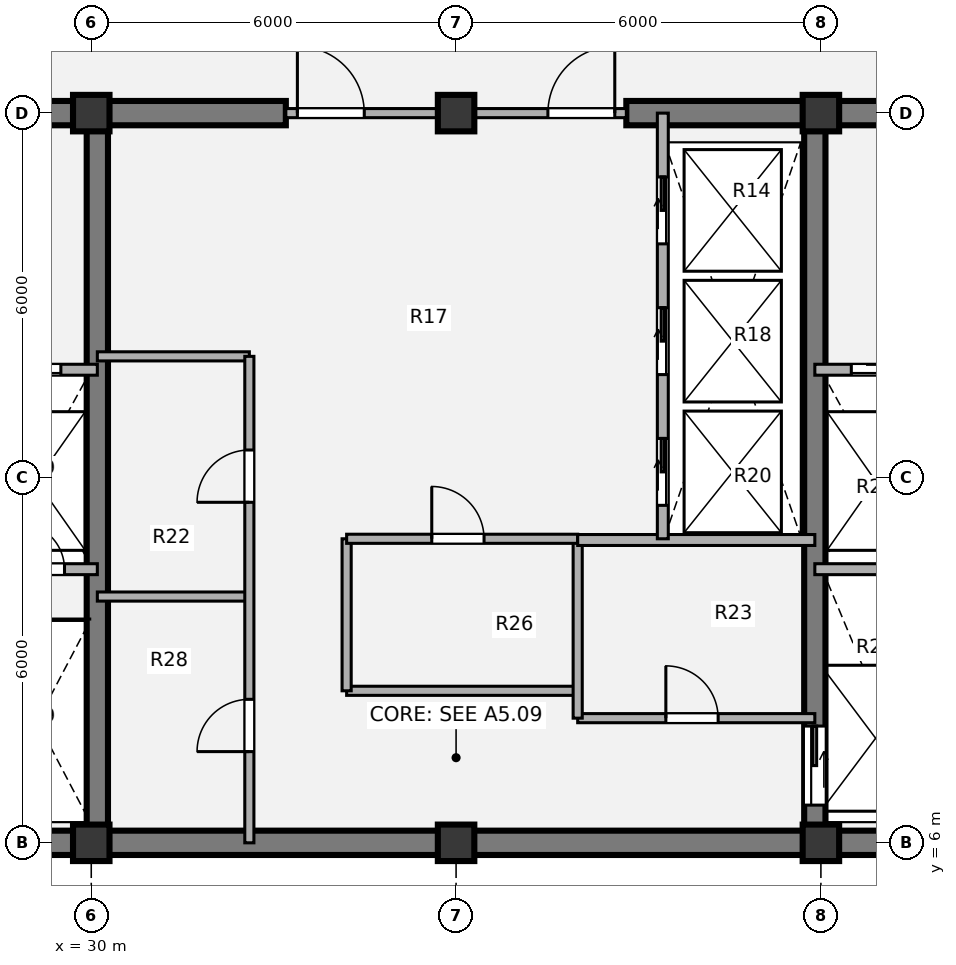
"""IFC4 building model, lengths in metres.
Left out: names, types, materials, properties, quantities, classifications, styles, units other than length and angle.
Written with IfcOpenShell. Run it as: python <this file> out.ifc"""

import sys

from ifc_helpers import new_model, si_unit, direction, frame, frame_2d, origin, origin_2d, place, context, subcontext, project, spatial, rectangle, extrude, source, transform, mapped, element, fill, save


model = new_model("IFC4")
c1 = context("Model", 3, precision=1e-05, world=origin(), true_north=direction((0.0, 1.0)))
c2 = subcontext(c1, "Body", "Model", "MODEL_VIEW")
j1 = project(units=[si_unit("LENGTHUNIT", "METRE"), si_unit("PLANEANGLEUNIT", "RADIAN")], contexts=[c1])
p1 = place(None, origin())
s1 = spatial("IfcSite", under=j1, at=p1, CompositionType="ELEMENT")
p2 = place(p1, origin())
s2 = spatial("IfcBuilding", under=s1, at=p2, CompositionType="ELEMENT")
p3 = place(p2, frame((0.0, 0.0, 283.5)))
s3 = spatial("IfcBuildingStorey", under=s2, at=p3, CompositionType="ELEMENT", Elevation=283.5)
m1 = source(origin(), c2, "Body", "SweptSolid", [
    extrude(rectangle(XDim=0.6, YDim=0.6, at=origin_2d()), origin(), (0.0, 0.0, 1.0), 3.78),
])
for number, where, z_axis, x_axis in (
    (1, (30.0, 6.0, 0.0), (0.0, 0.0, 1.0), (1.0, 0.0, 0.0)),
    (2, (36.0, 6.0, 0.0), (0.0, 0.0, 1.0), (1.0, 0.0, 0.0)),
    (3, (42.0, 6.0, 0.0), (0.0, 0.0, 1.0), (1.0, 0.0, 0.0)),
    (4, (30.0, 18.0, 0.0), (0.0, 0.0, 1.0), (1.0, 0.0, 0.0)),
    (5, (36.0, 18.0, 0.0), (0.0, 0.0, 1.0), (1.0, 0.0, 0.0)),
    (6, (42.0, 18.0, 0.0), (0.0, 0.0, 1.0), (1.0, 0.0, 0.0)),
):
    element("IfcColumn", number, at=place(p3, frame(where, z_axis=z_axis, x_axis=x_axis)), inside=s3, PredefinedType="COLUMN", context=c2, shape_type="MappedRepresentation", body=[
        mapped(m1, transform((0.0, 0.0, 0.0), x_axis=(1.0, 0.0, 0.0), y_axis=(0.0, 1.0, 0.0), z_axis=(0.0, 0.0, 1.0), scale=1.0)),
    ])
p4 = place(p3, frame((48.2, 6.0, 0.0), z_axis=(0.0, 0.0, 1.0), x_axis=(-1.0, 0.0, 0.0)))
e7 = element("IfcWall", 7, at=p4, inside=s3, PredefinedType="SHEAR", context=c2, shape_type="SweptSolid", body=[
    extrude(rectangle(XDim=24.4, YDim=0.4, at=frame_2d((12.2, 0.0))), origin(), (0.0, 0.0, 1.0), 3.78),
])
p5 = place(p3, frame((23.8, 18.0, 0.0), z_axis=(0.0, 0.0, 1.0), x_axis=(1.0, 0.0, 0.0)))
e8 = element("IfcWall", 8, at=p5, inside=s3, PredefinedType="SHEAR", context=c2, shape_type="SweptSolid", body=[
    extrude(rectangle(XDim=9.4, YDim=0.4, at=frame_2d((4.7, 0.0))), origin(), (0.0, 0.0, 1.0), 3.78),
])
p6 = place(p5, frame((2.95, 0.0, 0.0)))
e9 = element("IfcOpeningElement", 9, at=p6, cuts=e8, PredefinedType="OPENING", context=c2, shape_type="SweptSolid", body=[
    extrude(rectangle(XDim=1.1, YDim=2.1, at=origin_2d()), frame((0.55, 0.21, 1.05), z_axis=(0.0, -1.0, 0.0), x_axis=(1.0, 0.0, 0.0)), (0.0, 0.0, 1.0), 0.42),
])
p7 = place(p3, frame((38.8, 18.0, 0.0), z_axis=(0.0, 0.0, 1.0), x_axis=(1.0, 0.0, 0.0)))
e10 = element("IfcWall", 10, at=p7, inside=s3, PredefinedType="SHEAR", context=c2, shape_type="SweptSolid", body=[
    extrude(rectangle(XDim=9.4, YDim=0.4, at=frame_2d((4.7, 0.0))), origin(), (0.0, 0.0, 1.0), 3.78),
])
p8 = place(p7, frame((5.45, 0.0, 0.0)))
e11 = element("IfcOpeningElement", 11, at=p8, cuts=e10, PredefinedType="OPENING", context=c2, shape_type="SweptSolid", body=[
    extrude(rectangle(XDim=1.1, YDim=2.1, at=origin_2d()), frame((0.55, 0.21, 1.05), z_axis=(0.0, -1.0, 0.0), x_axis=(1.0, 0.0, 0.0)), (0.0, 0.0, 1.0), 0.42),
])
p9 = place(p3, frame((30.1, 6.0, 0.0), z_axis=(0.0, 0.0, 1.0), x_axis=(0.0, 1.0, 0.0)))
e12 = element("IfcWall", 12, at=p9, inside=s3, PredefinedType="SHEAR", context=c2, shape_type="SweptSolid", body=[
    extrude(rectangle(XDim=12.0, YDim=0.35, at=frame_2d((6.0, 0.0))), origin(), (0.0, 0.0, 1.0), 3.78),
])
p10 = place(p3, frame((41.9, 18.0, 0.0), z_axis=(0.0, 0.0, 1.0), x_axis=(0.0, -1.0, 0.0)))
e13 = element("IfcWall", 13, at=p10, inside=s3, PredefinedType="SHEAR", context=c2, shape_type="SweptSolid", body=[
    extrude(rectangle(XDim=12.0, YDim=0.35, at=frame_2d((6.0, 0.0))), origin(), (0.0, 0.0, 1.0), 3.78),
])
p11 = place(p10, frame((10.08, 0.0, 0.0)))
e14 = element("IfcOpeningElement", 14, at=p11, cuts=e13, PredefinedType="OPENING", context=c2, shape_type="SweptSolid", body=[
    extrude(rectangle(XDim=1.3, YDim=2.1, at=origin_2d()), frame((0.65, 0.185, 1.05), z_axis=(0.0, -1.0, 0.0), x_axis=(1.0, 0.0, 0.0)), (0.0, 0.0, 1.0), 0.37),
])
p12 = place(p3, frame((30.1, 14.0, 0.0), z_axis=(0.0, 0.0, 1.0), x_axis=(1.0, 0.0, 0.0)))
e15 = element("IfcWall", 15, at=p12, inside=s3, PredefinedType="PARTITIONING", context=c2, shape_type="SweptSolid", body=[
    extrude(rectangle(XDim=2.5, YDim=0.15, at=frame_2d((1.25, 0.0))), origin(), (0.0, 0.0, 1.0), 3.5),
])
p13 = place(p3, frame((34.2, 8.5, 0.0), z_axis=(0.0, 0.0, 1.0), x_axis=(1.0, 0.0, 0.0)))
e16 = element("IfcWall", 16, at=p13, inside=s3, PredefinedType="PARTITIONING", context=c2, shape_type="SweptSolid", body=[
    extrude(rectangle(XDim=3.8, YDim=0.15, at=frame_2d((1.9, 0.0))), origin(), (0.0, 0.0, 1.0), 3.5),
])
p14 = place(p3, frame((38.0, 8.05, 0.0), z_axis=(0.0, 0.0, 1.0), x_axis=(1.0, 0.0, 0.0)))
e17 = element("IfcWall", 17, at=p14, inside=s3, PredefinedType="PARTITIONING", context=c2, shape_type="SweptSolid", body=[
    extrude(rectangle(XDim=3.9, YDim=0.15, at=frame_2d((1.95, 0.0))), origin(), (0.0, 0.0, 1.0), 3.5),
])
p15 = place(p14, frame((1.45, 0.0, 0.0)))
e18 = element("IfcOpeningElement", 18, at=p15, cuts=e17, PredefinedType="OPENING", context=c2, shape_type="SweptSolid", body=[
    extrude(rectangle(XDim=0.86, YDim=2.1, at=origin_2d()), frame((0.43, 0.085, 1.05), z_axis=(0.0, -1.0, 0.0), x_axis=(1.0, 0.0, 0.0)), (0.0, 0.0, 1.0), 0.17),
])
p16 = place(p3, frame((34.2, 8.5, 0.0), z_axis=(0.0, 0.0, 1.0), x_axis=(0.0, 1.0, 0.0)))
e19 = element("IfcWall", 19, at=p16, inside=s3, PredefinedType="PARTITIONING", context=c2, shape_type="SweptSolid", body=[
    extrude(rectangle(XDim=2.5, YDim=0.15, at=frame_2d((1.25, 0.0))), origin(), (0.0, 0.0, 1.0), 3.5),
])
p17 = place(p3, frame((38.0, 8.05, 0.0), z_axis=(0.0, 0.0, 1.0), x_axis=(0.0, 1.0, 0.0)))
e20 = element("IfcWall", 20, at=p17, inside=s3, PredefinedType="PARTITIONING", context=c2, shape_type="SweptSolid", body=[
    extrude(rectangle(XDim=2.95, YDim=0.15, at=frame_2d((1.475, 0.0))), origin(), (0.0, 0.0, 1.0), 3.5),
])
p18 = place(p3, frame((34.2, 11.0, 0.0), z_axis=(0.0, 0.0, 1.0), x_axis=(1.0, 0.0, 0.0)))
e21 = element("IfcWall", 21, at=p18, inside=s3, PredefinedType="PARTITIONING", context=c2, shape_type="SweptSolid", body=[
    extrude(rectangle(XDim=3.8, YDim=0.15, at=frame_2d((1.9, 0.0))), origin(), (0.0, 0.0, 1.0), 3.5),
])
p19 = place(p18, frame((1.4, 0.0, 0.0)))
e22 = element("IfcOpeningElement", 22, at=p19, cuts=e21, PredefinedType="OPENING", context=c2, shape_type="SweptSolid", body=[
    extrude(rectangle(XDim=0.86, YDim=2.1, at=origin_2d()), frame((0.43, 0.085, 1.05), z_axis=(0.0, -1.0, 0.0), x_axis=(1.0, 0.0, 0.0)), (0.0, 0.0, 1.0), 0.17),
])
p20 = place(p3, frame((38.0, 10.98, 0.0), z_axis=(0.0, 0.0, 1.0), x_axis=(1.0, 0.0, 0.0)))
e23 = element("IfcWall", 23, at=p20, inside=s3, PredefinedType="PARTITIONING", context=c2, shape_type="SweptSolid", body=[
    extrude(rectangle(XDim=3.9, YDim=0.18, at=frame_2d((1.95, 0.0))), origin(), (0.0, 0.0, 1.0), 3.5),
])
p21 = place(p3, frame((30.1, 10.05, 0.0), z_axis=(0.0, 0.0, 1.0), x_axis=(1.0, 0.0, 0.0)))
e24 = element("IfcWall", 24, at=p21, inside=s3, PredefinedType="PARTITIONING", context=c2, shape_type="SweptSolid", body=[
    extrude(rectangle(XDim=2.5, YDim=0.15, at=frame_2d((1.25, 0.0))), origin(), (0.0, 0.0, 1.0), 3.5),
])
p22 = place(p3, frame((32.6, 6.0, 0.0), z_axis=(0.0, 0.0, 1.0), x_axis=(0.0, 1.0, 0.0)))
e25 = element("IfcWall", 25, at=p22, inside=s3, PredefinedType="PARTITIONING", context=c2, shape_type="SweptSolid", body=[
    extrude(rectangle(XDim=8.0, YDim=0.15, at=frame_2d((4.0, 0.0))), origin(), (0.0, 0.0, 1.0), 3.5),
])
p23 = place(p22, frame((1.5, 0.0, 0.0)))
e26 = element("IfcOpeningElement", 26, at=p23, cuts=e25, PredefinedType="OPENING", context=c2, shape_type="SweptSolid", body=[
    extrude(rectangle(XDim=0.86, YDim=2.1, at=origin_2d()), frame((0.43, 0.085, 1.05), z_axis=(0.0, -1.0, 0.0), x_axis=(1.0, 0.0, 0.0)), (0.0, 0.0, 1.0), 0.17),
])
p24 = place(p22, frame((5.6, 0.0, 0.0)))
e27 = element("IfcOpeningElement", 27, at=p24, cuts=e25, PredefinedType="OPENING", context=c2, shape_type="SweptSolid", body=[
    extrude(rectangle(XDim=0.86, YDim=2.1, at=origin_2d()), frame((0.43, 0.085, 1.05), z_axis=(0.0, -1.0, 0.0), x_axis=(1.0, 0.0, 0.0)), (0.0, 0.0, 1.0), 0.17),
])
p25 = place(p3, frame((33.2, 18.0, 0.0), z_axis=(0.0, 0.0, 1.0), x_axis=(1.0, 0.0, 0.0)))
e28 = element("IfcWall", 28, at=p25, inside=s3, PredefinedType="PARTITIONING", context=c2, shape_type="SweptSolid", body=[
    extrude(rectangle(XDim=5.6, YDim=0.15, at=frame_2d((2.8, 0.0))), origin(), (0.0, 0.0, 1.0), 2.515),
])
p26 = place(p25, frame((0.19, 0.0, 0.0)))
e29 = element("IfcOpeningElement", 29, at=p26, cuts=e28, PredefinedType="OPENING", context=c2, shape_type="SweptSolid", body=[
    extrude(rectangle(XDim=1.1, YDim=2.1, at=origin_2d()), frame((0.55, 0.085, 1.05), z_axis=(0.0, -1.0, 0.0), x_axis=(1.0, 0.0, 0.0)), (0.0, 0.0, 1.0), 0.17),
])
p27 = place(p25, frame((4.31, 0.0, 0.0)))
e30 = element("IfcOpeningElement", 30, at=p27, cuts=e28, PredefinedType="OPENING", context=c2, shape_type="SweptSolid", body=[
    extrude(rectangle(XDim=1.1, YDim=2.1, at=origin_2d()), frame((0.55, 0.085, 1.05), z_axis=(0.0, -1.0, 0.0), x_axis=(1.0, 0.0, 0.0)), (0.0, 0.0, 1.0), 0.17),
])
p28 = place(p3, frame((24.0, 13.78, 0.0), z_axis=(0.0, 0.0, 1.0), x_axis=(1.0, 0.0, 0.0)))
e31 = element("IfcWall", 31, at=p28, inside=s3, PredefinedType="PARTITIONING", context=c2, shape_type="SweptSolid", body=[
    extrude(rectangle(XDim=6.1, YDim=0.18, at=frame_2d((3.05, 0.0))), origin(), (0.0, 0.0, 1.0), 3.5),
])
p29 = place(p28, frame((1.15, 0.0, 0.0)))
e32 = element("IfcOpeningElement", 32, at=p29, cuts=e31, PredefinedType="OPENING", context=c2, shape_type="SweptSolid", body=[
    extrude(rectangle(XDim=1.1, YDim=2.1, at=origin_2d()), frame((0.55, 0.1, 1.05), z_axis=(0.0, -1.0, 0.0), x_axis=(1.0, 0.0, 0.0)), (0.0, 0.0, 1.0), 0.2),
])
p30 = place(p28, frame((4.4, 0.0, 0.0)))
e33 = element("IfcOpeningElement", 33, at=p30, cuts=e31, PredefinedType="OPENING", context=c2, shape_type="SweptSolid", body=[
    extrude(rectangle(XDim=1.1, YDim=2.1, at=origin_2d()), frame((0.55, 0.1, 1.05), z_axis=(0.0, -1.0, 0.0), x_axis=(1.0, 0.0, 0.0)), (0.0, 0.0, 1.0), 0.2),
])
p31 = place(p3, frame((28.15, 10.5, 0.0), z_axis=(0.0, 0.0, 1.0), x_axis=(1.0, 0.0, 0.0)))
e34 = element("IfcWall", 34, at=p31, inside=s3, PredefinedType="PARTITIONING", context=c2, shape_type="SweptSolid", body=[
    extrude(rectangle(XDim=1.95, YDim=0.18, at=frame_2d((0.975, 0.0))), origin(), (0.0, 0.0, 1.0), 3.5),
])
p32 = place(p31, frame((0.65, 0.0, 0.0)))
e35 = element("IfcOpeningElement", 35, at=p32, cuts=e34, PredefinedType="OPENING", context=c2, shape_type="SweptSolid", body=[
    extrude(rectangle(XDim=0.76, YDim=2.05, at=origin_2d()), frame((0.38, 0.1, 1.025), z_axis=(0.0, -1.0, 0.0), x_axis=(1.0, 0.0, 0.0)), (0.0, 0.0, 1.0), 0.2),
])
p33 = place(p3, frame((41.9, 13.78, 0.0), z_axis=(0.0, 0.0, 1.0), x_axis=(1.0, 0.0, 0.0)))
e36 = element("IfcWall", 36, at=p33, inside=s3, PredefinedType="PARTITIONING", context=c2, shape_type="SweptSolid", body=[
    extrude(rectangle(XDim=6.1, YDim=0.18, at=frame_2d((3.05, 0.0))), origin(), (0.0, 0.0, 1.0), 3.5),
])
p34 = place(p33, frame((0.6, 0.0, 0.0)))
e37 = element("IfcOpeningElement", 37, at=p34, cuts=e36, PredefinedType="OPENING", context=c2, shape_type="SweptSolid", body=[
    extrude(rectangle(XDim=1.1, YDim=2.1, at=origin_2d()), frame((0.55, 0.1, 1.05), z_axis=(0.0, -1.0, 0.0), x_axis=(1.0, 0.0, 0.0)), (0.0, 0.0, 1.0), 0.2),
])
p35 = place(p33, frame((3.8, 0.0, 0.0)))
e38 = element("IfcOpeningElement", 38, at=p35, cuts=e36, PredefinedType="OPENING", context=c2, shape_type="SweptSolid", body=[
    extrude(rectangle(XDim=1.1, YDim=2.1, at=origin_2d()), frame((0.55, 0.1, 1.05), z_axis=(0.0, -1.0, 0.0), x_axis=(1.0, 0.0, 0.0)), (0.0, 0.0, 1.0), 0.2),
])
p36 = place(p3, frame((41.9, 10.5, 0.0), z_axis=(0.0, 0.0, 1.0), x_axis=(1.0, 0.0, 0.0)))
e39 = element("IfcWall", 39, at=p36, inside=s3, PredefinedType="PARTITIONING", context=c2, shape_type="SweptSolid", body=[
    extrude(rectangle(XDim=1.95, YDim=0.18, at=frame_2d((0.975, 0.0))), origin(), (0.0, 0.0, 1.0), 3.5),
])
p37 = place(p3, frame((39.4, 11.0, 0.0), z_axis=(0.0, 0.0, 1.0), x_axis=(0.0, 1.0, 0.0)))
e40 = element("IfcWall", 40, at=p37, inside=s3, PredefinedType="PARTITIONING", context=c2, shape_type="SweptSolid", body=[
    extrude(rectangle(XDim=7.0, YDim=0.18, at=frame_2d((3.5, 0.0))), origin(), (0.0, 0.0, 1.0), 3.5),
])
p38 = place(p37, frame((0.55, 0.0, 0.0)))
e41 = element("IfcOpeningElement", 41, at=p38, cuts=e40, PredefinedType="OPENING", context=c2, shape_type="SweptSolid", body=[
    extrude(rectangle(XDim=1.1, YDim=2.1, at=origin_2d()), frame((0.55, 0.1, 1.05), z_axis=(0.0, -1.0, 0.0), x_axis=(1.0, 0.0, 0.0)), (0.0, 0.0, 1.0), 0.2),
])
p39 = place(p37, frame((2.7, 0.0, 0.0)))
e42 = element("IfcOpeningElement", 42, at=p39, cuts=e40, PredefinedType="OPENING", context=c2, shape_type="SweptSolid", body=[
    extrude(rectangle(XDim=1.1, YDim=2.1, at=origin_2d()), frame((0.55, 0.1, 1.05), z_axis=(0.0, -1.0, 0.0), x_axis=(1.0, 0.0, 0.0)), (0.0, 0.0, 1.0), 0.2),
])
p40 = place(p37, frame((4.85, 0.0, 0.0)))
e43 = element("IfcOpeningElement", 43, at=p40, cuts=e40, PredefinedType="OPENING", context=c2, shape_type="SweptSolid", body=[
    extrude(rectangle(XDim=1.1, YDim=2.1, at=origin_2d()), frame((0.55, 0.1, 1.05), z_axis=(0.0, -1.0, 0.0), x_axis=(1.0, 0.0, 0.0)), (0.0, 0.0, 1.0), 0.2),
])
m2 = source(origin(), c2, "Body", "SweptSolid", [
    extrude(rectangle(XDim=0.86, YDim=2.1, at=origin_2d()), frame((0.43, 0.025, 1.05), z_axis=(0.0, -1.0, 0.0), x_axis=(1.0, 0.0, 0.0)), (0.0, 0.0, 1.0), 0.05),
])
p41 = place(p15, origin())
e44 = element("IfcDoor", 44, at=p41, inside=s3, OperationType="SINGLE_SWING_LEFT", PredefinedType="DOOR", context=c2, shape_type="MappedRepresentation", body=[
    mapped(m2, transform((0.0, 0.0, 0.0), x_axis=(1.0, 0.0, 0.0), y_axis=(0.0, 1.0, 0.0), z_axis=(0.0, 0.0, 1.0), scale=1.0)),
])
fill(e18, e44)
p42 = place(p19, origin())
e45 = element("IfcDoor", 45, at=p42, inside=s3, OperationType="SINGLE_SWING_LEFT", PredefinedType="DOOR", context=c2, shape_type="MappedRepresentation", body=[
    mapped(m2, transform((0.0, 0.0, 0.0), x_axis=(1.0, 0.0, 0.0), y_axis=(0.0, 1.0, 0.0), z_axis=(0.0, 0.0, 1.0), scale=1.0)),
])
fill(e22, e45)
p43 = place(p23, origin())
e46 = element("IfcDoor", 46, at=p43, inside=s3, OperationType="SINGLE_SWING_LEFT", PredefinedType="DOOR", context=c2, shape_type="MappedRepresentation", body=[
    mapped(m2, transform((0.0, 0.0, 0.0), x_axis=(1.0, 0.0, 0.0), y_axis=(0.0, 1.0, 0.0), z_axis=(0.0, 0.0, 1.0), scale=1.0)),
])
fill(e26, e46)
p44 = place(p24, origin())
e47 = element("IfcDoor", 47, at=p44, inside=s3, OperationType="SINGLE_SWING_LEFT", PredefinedType="DOOR", context=c2, shape_type="MappedRepresentation", body=[
    mapped(m2, transform((0.0, 0.0, 0.0), x_axis=(1.0, 0.0, 0.0), y_axis=(0.0, 1.0, 0.0), z_axis=(0.0, 0.0, 1.0), scale=1.0)),
])
fill(e27, e47)
m3 = source(origin(), c2, "Body", "SweptSolid", [
    extrude(rectangle(XDim=1.1, YDim=2.1, at=origin_2d()), frame((0.55, 0.025, 1.05), z_axis=(0.0, -1.0, 0.0), x_axis=(1.0, 0.0, 0.0)), (0.0, 0.0, 1.0), 0.05),
])
p45 = place(p26, origin())
e48 = element("IfcDoor", 48, at=p45, inside=s3, OperationType="SINGLE_SWING_LEFT", PredefinedType="DOOR", context=c2, shape_type="MappedRepresentation", body=[
    mapped(m3, transform((0.0, 0.0, 0.0), x_axis=(1.0, 0.0, 0.0), y_axis=(0.0, 1.0, 0.0), z_axis=(0.0, 0.0, 1.0), scale=1.0)),
])
fill(e29, e48)
p46 = place(p27, origin())
e49 = element("IfcDoor", 49, at=p46, inside=s3, OperationType="SINGLE_SWING_RIGHT", PredefinedType="DOOR", context=c2, shape_type="MappedRepresentation", body=[
    mapped(m3, transform((0.0, 0.0, 0.0), x_axis=(1.0, 0.0, 0.0), y_axis=(0.0, 1.0, 0.0), z_axis=(0.0, 0.0, 1.0), scale=1.0)),
])
fill(e30, e49)
m4 = source(origin(), c2, "Body", "SweptSolid", [
    extrude(rectangle(XDim=1.1, YDim=2.1, at=origin_2d()), frame((0.55, 0.025, 1.05), z_axis=(0.0, -1.0, 0.0), x_axis=(1.0, 0.0, 0.0)), (0.0, 0.0, 1.0), 0.05),
])
p47 = place(p30, origin())
e50 = element("IfcDoor", 50, at=p47, inside=s3, OperationType="SLIDING_TO_LEFT", PredefinedType="DOOR", context=c2, shape_type="MappedRepresentation", body=[
    mapped(m4, transform((0.0, 0.0, 0.0), x_axis=(1.0, 0.0, 0.0), y_axis=(0.0, 1.0, 0.0), z_axis=(0.0, 0.0, 1.0), scale=1.0)),
])
fill(e33, e50)
m5 = source(origin(), c2, "Body", "SweptSolid", [
    extrude(rectangle(XDim=0.76, YDim=2.05, at=origin_2d()), frame((0.38, 0.025, 1.025), z_axis=(0.0, -1.0, 0.0), x_axis=(1.0, 0.0, 0.0)), (0.0, 0.0, 1.0), 0.05),
])
p48 = place(p32, origin())
e51 = element("IfcDoor", 51, at=p48, inside=s3, OperationType="SINGLE_SWING_LEFT", PredefinedType="DOOR", context=c2, shape_type="MappedRepresentation", body=[
    mapped(m5, transform((0.0, 0.0, 0.0), x_axis=(1.0, 0.0, 0.0), y_axis=(0.0, 1.0, 0.0), z_axis=(0.0, 0.0, 1.0), scale=1.0)),
])
fill(e35, e51)
p49 = place(p34, origin())
e52 = element("IfcDoor", 52, at=p49, inside=s3, OperationType="SLIDING_TO_RIGHT", PredefinedType="DOOR", context=c2, shape_type="MappedRepresentation", body=[
    mapped(m4, transform((0.0, 0.0, 0.0), x_axis=(1.0, 0.0, 0.0), y_axis=(0.0, 1.0, 0.0), z_axis=(0.0, 0.0, 1.0), scale=1.0)),
])
fill(e37, e52)
m6 = source(origin(), c2, "Body", "SweptSolid", [
    extrude(rectangle(XDim=1.3, YDim=2.1, at=origin_2d()), frame((0.65, 0.025, 1.05), z_axis=(0.0, -1.0, 0.0), x_axis=(1.0, 0.0, 0.0)), (0.0, 0.0, 1.0), 0.05),
])
p50 = place(p11, origin())
e53 = element("IfcDoor", 53, at=p50, inside=s3, OperationType="SLIDING_TO_LEFT", PredefinedType="DOOR", context=c2, shape_type="MappedRepresentation", body=[
    mapped(m6, transform((0.0, 0.0, 0.0), x_axis=(1.0, 0.0, 0.0), y_axis=(0.0, 1.0, 0.0), z_axis=(0.0, 0.0, 1.0), scale=1.0)),
])
fill(e14, e53)
p51 = place(p38, origin())
e54 = element("IfcDoor", 54, at=p51, inside=s3, OperationType="SLIDING_TO_RIGHT", PredefinedType="DOOR", context=c2, shape_type="MappedRepresentation", body=[
    mapped(m4, transform((0.0, 0.0, 0.0), x_axis=(1.0, 0.0, 0.0), y_axis=(0.0, 1.0, 0.0), z_axis=(0.0, 0.0, 1.0), scale=1.0)),
])
fill(e41, e54)
p52 = place(p39, origin())
e55 = element("IfcDoor", 55, at=p52, inside=s3, OperationType="SLIDING_TO_RIGHT", PredefinedType="DOOR", context=c2, shape_type="MappedRepresentation", body=[
    mapped(m4, transform((0.0, 0.0, 0.0), x_axis=(1.0, 0.0, 0.0), y_axis=(0.0, 1.0, 0.0), z_axis=(0.0, 0.0, 1.0), scale=1.0)),
])
fill(e42, e55)
p53 = place(p40, origin())
e56 = element("IfcDoor", 56, at=p53, inside=s3, OperationType="SLIDING_TO_RIGHT", PredefinedType="DOOR", context=c2, shape_type="MappedRepresentation", body=[
    mapped(m4, transform((0.0, 0.0, 0.0), x_axis=(1.0, 0.0, 0.0), y_axis=(0.0, 1.0, 0.0), z_axis=(0.0, 0.0, 1.0), scale=1.0)),
])
fill(e43, e56)
save(model, sys.argv[1])
